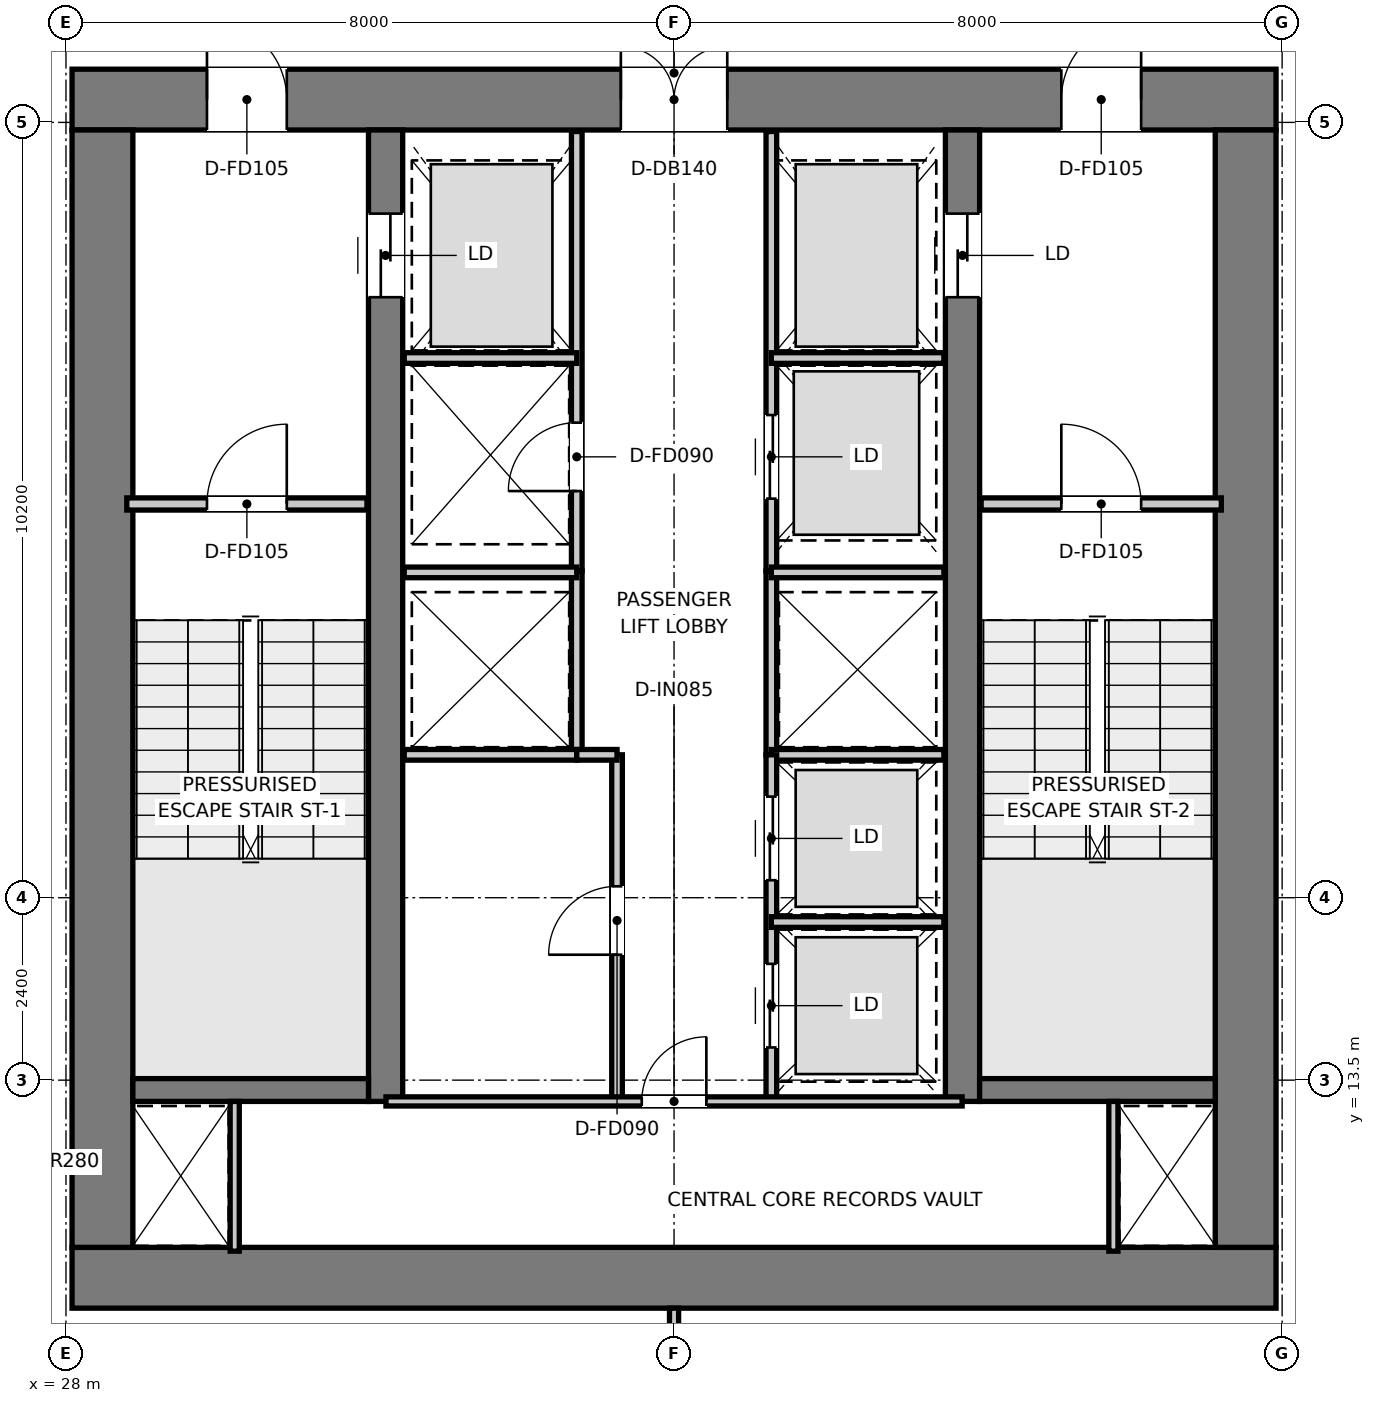
"""IFC4 building model, lengths in metres.
Left out: names, types, materials, properties, quantities, classifications, styles, units other than length and angle.
Written with IfcOpenShell. Run it as: python <this file> out.ifc"""

import sys

from ifc_helpers import new_model, si_unit, direction, frame, frame_2d, origin, place, context, subcontext, project, spatial, rectangle, extrude, element, fill, save


model = new_model("IFC4")
c1 = context("Model", 3, precision=1e-05, world=origin(), true_north=direction((0.0, 1.0)))
c2 = subcontext(c1, "Body", "Model", "MODEL_VIEW")
j1 = project(units=[si_unit("LENGTHUNIT", "METRE"), si_unit("PLANEANGLEUNIT", "RADIAN")], contexts=[c1])
p1 = place(None, origin())
s1 = spatial("IfcSite", under=j1, at=p1, CompositionType="ELEMENT")
p2 = place(p1, origin())
s2 = spatial("IfcBuilding", under=s1, at=p2, CompositionType="ELEMENT")
p3 = place(p2, frame((0.0, 0.0, 177.8)))
s3 = spatial("IfcBuildingStorey", under=s2, at=p3, CompositionType="ELEMENT", Elevation=177.8)
p4 = place(p3, frame((28.08, 10.9, 0.0), z_axis=(0.0, 0.0, 1.0), x_axis=(1.0, 0.0, 0.0)))
e1 = element("IfcWall", 1, at=p4, inside=s3, PredefinedType="SHEAR", context=c2, shape_type="SweptSolid", body=[
    extrude(rectangle(XDim=15.84, YDim=0.8, at=frame_2d((7.92, 0.0))), origin(), (0.0, 0.0, 1.0), 3.95),
])
p5 = place(p3, frame((28.08, 26.4, 0.0), z_axis=(0.0, 0.0, 1.0), x_axis=(1.0, 0.0, 0.0)))
e2 = element("IfcWall", 2, at=p5, inside=s3, PredefinedType="SHEAR", context=c2, shape_type="SweptSolid", body=[
    extrude(rectangle(XDim=15.84, YDim=0.8, at=frame_2d((7.92, 0.0))), origin(), (0.0, 0.0, 1.0), 3.95),
])
p6 = place(p5, frame((7.22, 0.0, 0.0)))
e3 = element("IfcOpeningElement", 3, at=p6, cuts=e2, PredefinedType="OPENING", context=c2, shape_type="SweptSolid", body=[
    extrude(rectangle(XDim=1.4, YDim=2.2, at=frame_2d((0.7, 1.1))), frame((0.0, 0.41, 0.0), z_axis=(0.0, -1.0, 0.0), x_axis=(1.0, 0.0, 0.0)), (0.0, 0.0, 1.0), 0.82),
])
p7 = place(p5, frame((1.775, 0.0, 0.0)))
e4 = element("IfcOpeningElement", 4, at=p7, cuts=e2, PredefinedType="OPENING", context=c2, shape_type="SweptSolid", body=[
    extrude(rectangle(XDim=1.05, YDim=2.1, at=frame_2d((0.525, 1.05))), frame((0.0, 0.41, 0.0), z_axis=(0.0, -1.0, 0.0), x_axis=(1.0, 0.0, 0.0)), (0.0, 0.0, 1.0), 0.82),
])
p8 = place(p5, frame((13.015, 0.0, 0.0)))
e5 = element("IfcOpeningElement", 5, at=p8, cuts=e2, PredefinedType="OPENING", context=c2, shape_type="SweptSolid", body=[
    extrude(rectangle(XDim=1.05, YDim=2.1, at=frame_2d((0.525, 1.05))), frame((0.0, 0.41, 0.0), z_axis=(0.0, -1.0, 0.0), x_axis=(1.0, 0.0, 0.0)), (0.0, 0.0, 1.0), 0.82),
])
for number, where, z_axis, x_axis in (
    (6, (28.48, 11.3, 0.0), (0.0, 0.0, 1.0), (0.0, 1.0, 0.0)),
    (7, (43.52, 11.3, 0.0), (0.0, 0.0, 1.0), (0.0, 1.0, 0.0)),
):
    element("IfcWall", number, at=place(p3, frame(where, z_axis=z_axis, x_axis=x_axis)), inside=s3, PredefinedType="SHEAR", context=c2, shape_type="SweptSolid", body=[
        extrude(rectangle(XDim=14.7, YDim=0.8, at=frame_2d((7.35, 0.0))), origin(), (0.0, 0.0, 1.0), 3.95),
    ])
p9 = place(p3, frame((32.205, 13.22, 0.0), z_axis=(0.0, 0.0, 1.0), x_axis=(0.0, 1.0, 0.0)))
e8 = element("IfcWall", 8, at=p9, inside=s3, PredefinedType="SHEAR", context=c2, shape_type="SweptSolid", body=[
    extrude(rectangle(XDim=12.78, YDim=0.45, at=frame_2d((6.39, 0.0))), origin(), (0.0, 0.0, 1.0), 3.95),
])
p10 = place(p9, frame((10.58, 0.0, 0.0)))
e9 = element("IfcOpeningElement", 9, at=p10, cuts=e8, PredefinedType="OPENING", context=c2, shape_type="SweptSolid", body=[
    extrude(rectangle(XDim=1.1, YDim=2.15, at=frame_2d((0.55, 1.075))), frame((0.0, 0.235, 0.0), z_axis=(0.0, -1.0, 0.0), x_axis=(1.0, 0.0, 0.0)), (0.0, 0.0, 1.0), 0.47),
])
p11 = place(p3, frame((39.795, 13.22, 0.0), z_axis=(0.0, 0.0, 1.0), x_axis=(0.0, 1.0, 0.0)))
e10 = element("IfcWall", 10, at=p11, inside=s3, PredefinedType="SHEAR", context=c2, shape_type="SweptSolid", body=[
    extrude(rectangle(XDim=12.78, YDim=0.45, at=frame_2d((6.39, 0.0))), origin(), (0.0, 0.0, 1.0), 3.95),
])
p12 = place(p11, frame((10.58, 0.0, 0.0)))
e11 = element("IfcOpeningElement", 11, at=p12, cuts=e10, PredefinedType="OPENING", context=c2, shape_type="SweptSolid", body=[
    extrude(rectangle(XDim=1.1, YDim=2.15, at=frame_2d((0.55, 1.075))), frame((0.0, 0.235, 0.0), z_axis=(0.0, -1.0, 0.0), x_axis=(1.0, 0.0, 0.0)), (0.0, 0.0, 1.0), 0.47),
])
for number, where, z_axis, x_axis in (
    (12, (28.88, 13.37, 0.0), (0.0, 0.0, 1.0), (1.0, 0.0, 0.0)),
    (13, (40.02, 13.37, 0.0), (0.0, 0.0, 1.0), (1.0, 0.0, 0.0)),
):
    element("IfcWall", number, at=place(p3, frame(where, z_axis=z_axis, x_axis=x_axis)), inside=s3, PredefinedType="SHEAR", context=c2, shape_type="SweptSolid", body=[
        extrude(rectangle(XDim=3.1, YDim=0.3, at=frame_2d((1.55, 0.0))), origin(), (0.0, 0.0, 1.0), 3.95),
    ])
p13 = place(p3, frame((28.8, 21.08, 0.0), z_axis=(0.0, 0.0, 1.0), x_axis=(1.0, 0.0, 0.0)))
e14 = element("IfcWall", 14, at=p13, inside=s3, PredefinedType="PARTITIONING", context=c2, shape_type="SweptSolid", body=[
    extrude(rectangle(XDim=3.16, YDim=0.16, at=frame_2d((1.58, 0.0))), origin(), (0.0, 0.0, 1.0), 3.67),
])
p14 = place(p13, frame((1.055, 0.0, 0.0)))
e15 = element("IfcOpeningElement", 15, at=p14, cuts=e14, PredefinedType="OPENING", context=c2, shape_type="SweptSolid", body=[
    extrude(rectangle(XDim=1.05, YDim=2.1, at=frame_2d((0.525, 1.05))), frame((0.0, 0.09, 0.0), z_axis=(0.0, -1.0, 0.0), x_axis=(1.0, 0.0, 0.0)), (0.0, 0.0, 1.0), 0.18),
])
p15 = place(p3, frame((40.04, 21.08, 0.0), z_axis=(0.0, 0.0, 1.0), x_axis=(1.0, 0.0, 0.0)))
e16 = element("IfcWall", 16, at=p15, inside=s3, PredefinedType="PARTITIONING", context=c2, shape_type="SweptSolid", body=[
    extrude(rectangle(XDim=3.16, YDim=0.16, at=frame_2d((1.58, 0.0))), origin(), (0.0, 0.0, 1.0), 3.67),
])
p16 = place(p15, frame((1.055, 0.0, 0.0)))
e17 = element("IfcOpeningElement", 17, at=p16, cuts=e16, PredefinedType="OPENING", context=c2, shape_type="SweptSolid", body=[
    extrude(rectangle(XDim=1.05, YDim=2.1, at=frame_2d((0.525, 1.05))), frame((0.0, 0.09, 0.0), z_axis=(0.0, -1.0, 0.0), x_axis=(1.0, 0.0, 0.0)), (0.0, 0.0, 1.0), 0.18),
])
p17 = place(p3, frame((34.72, 20.2, 0.0), z_axis=(0.0, 0.0, 1.0), x_axis=(0.0, 1.0, 0.0)))
e18 = element("IfcWall", 18, at=p17, inside=s3, PredefinedType="PARTITIONING", context=c2, shape_type="SweptSolid", body=[
    extrude(rectangle(XDim=5.78, YDim=0.14, at=frame_2d((2.89, 0.0))), origin(), (0.0, 0.0, 1.0), 2.67),
])
p18 = place(p17, frame((1.05, 0.0, 0.0)))
e19 = element("IfcOpeningElement", 19, at=p18, cuts=e18, PredefinedType="OPENING", context=c2, shape_type="SweptSolid", body=[
    extrude(rectangle(XDim=0.9, YDim=2.1, at=frame_2d((0.45, 1.05))), frame((0.0, 0.08, 0.0), z_axis=(0.0, -1.0, 0.0), x_axis=(1.0, 0.0, 0.0)), (0.0, 0.0, 1.0), 0.16),
])
p19 = place(p3, frame((37.28, 20.2, 0.0), z_axis=(0.0, 0.0, 1.0), x_axis=(0.0, 1.0, 0.0)))
e20 = element("IfcWall", 20, at=p19, inside=s3, PredefinedType="PARTITIONING", context=c2, shape_type="SweptSolid", body=[
    extrude(rectangle(XDim=5.78, YDim=0.14, at=frame_2d((2.89, 0.0))), origin(), (0.0, 0.0, 1.0), 2.67),
])
p20 = place(p19, frame((0.95, 0.0, 0.0)))
e21 = element("IfcOpeningElement", 21, at=p20, cuts=e20, PredefinedType="OPENING", context=c2, shape_type="SweptSolid", body=[
    extrude(rectangle(XDim=1.1, YDim=2.15, at=frame_2d((0.55, 1.075))), frame((0.0, 0.08, 0.0), z_axis=(0.0, -1.0, 0.0), x_axis=(1.0, 0.0, 0.0)), (0.0, 0.0, 1.0), 0.16),
])
for number, where, z_axis, x_axis in (
    (22, (32.45, 23.0, 0.0), (0.0, 0.0, 1.0), (1.0, 0.0, 0.0)),
    (23, (37.28, 23.0, 0.0), (0.0, 0.0, 1.0), (1.0, 0.0, 0.0)),
):
    element("IfcWall", number, at=place(p3, frame(where, z_axis=z_axis, x_axis=x_axis)), inside=s3, PredefinedType="PARTITIONING", context=c2, shape_type="SweptSolid", body=[
        extrude(rectangle(XDim=2.27, YDim=0.14, at=frame_2d((1.135, 0.0))), origin(), (0.0, 0.0, 1.0), 2.67),
    ])
for number, where, z_axis, x_axis in (
    (24, (34.72, 17.78, 0.0), (0.0, 0.0, 1.0), (0.0, 1.0, 0.0)),
    (25, (37.28, 17.78, 0.0), (0.0, 0.0, 1.0), (0.0, 1.0, 0.0)),
):
    element("IfcWall", number, at=place(p3, frame(where, z_axis=z_axis, x_axis=x_axis)), inside=s3, PredefinedType="PARTITIONING", context=c2, shape_type="SweptSolid", body=[
        extrude(rectangle(XDim=2.42, YDim=0.14, at=frame_2d((1.21, 0.0))), origin(), (0.0, 0.0, 1.0), 3.67),
    ])
for number, where, z_axis, x_axis in (
    (26, (32.45, 17.78, 0.0), (0.0, 0.0, 1.0), (1.0, 0.0, 0.0)),
    (27, (32.45, 20.18, 0.0), (0.0, 0.0, 1.0), (1.0, 0.0, 0.0)),
    (28, (37.28, 17.78, 0.0), (0.0, 0.0, 1.0), (1.0, 0.0, 0.0)),
    (29, (37.28, 20.18, 0.0), (0.0, 0.0, 1.0), (1.0, 0.0, 0.0)),
):
    element("IfcWall", number, at=place(p3, frame(where, z_axis=z_axis, x_axis=x_axis)), inside=s3, PredefinedType="PARTITIONING", context=c2, shape_type="SweptSolid", body=[
        extrude(rectangle(XDim=2.27, YDim=0.14, at=frame_2d((1.135, 0.0))), origin(), (0.0, 0.0, 1.0), 3.67),
    ])
p21 = place(p3, frame((35.25, 13.22, 0.0), z_axis=(0.0, 0.0, 1.0), x_axis=(0.0, 1.0, 0.0)))
e30 = element("IfcWall", 30, at=p21, inside=s3, PredefinedType="PARTITIONING", context=c2, shape_type="SweptSolid", body=[
    extrude(rectangle(XDim=4.56, YDim=0.14, at=frame_2d((2.28, 0.0))), origin(), (0.0, 0.0, 1.0), 3.67),
])
p22 = place(p21, frame((1.93, 0.0, 0.0)))
e31 = element("IfcOpeningElement", 31, at=p22, cuts=e30, PredefinedType="OPENING", context=c2, shape_type="SweptSolid", body=[
    extrude(rectangle(XDim=0.9, YDim=2.1, at=frame_2d((0.45, 1.05))), frame((0.0, 0.08, 0.0), z_axis=(0.0, -1.0, 0.0), x_axis=(1.0, 0.0, 0.0)), (0.0, 0.0, 1.0), 0.16),
])
p23 = place(p3, frame((34.72, 17.78, 0.0), z_axis=(0.0, 0.0, 1.0), x_axis=(1.0, 0.0, 0.0)))
e32 = element("IfcWall", 32, at=p23, inside=s3, PredefinedType="PARTITIONING", context=c2, shape_type="SweptSolid", body=[
    extrude(rectangle(XDim=0.53, YDim=0.14, at=frame_2d((0.265, 0.0))), origin(), (0.0, 0.0, 1.0), 3.67),
])
p24 = place(p3, frame((37.28, 13.22, 0.0), z_axis=(0.0, 0.0, 1.0), x_axis=(0.0, 1.0, 0.0)))
e33 = element("IfcWall", 33, at=p24, inside=s3, PredefinedType="PARTITIONING", context=c2, shape_type="SweptSolid", body=[
    extrude(rectangle(XDim=4.56, YDim=0.14, at=frame_2d((2.28, 0.0))), origin(), (0.0, 0.0, 1.0), 3.67),
])
p25 = place(p24, frame((0.71, 0.0, 0.0)))
e34 = element("IfcOpeningElement", 34, at=p25, cuts=e33, PredefinedType="OPENING", context=c2, shape_type="SweptSolid", body=[
    extrude(rectangle(XDim=1.1, YDim=2.15, at=frame_2d((0.55, 1.075))), frame((0.0, 0.08, 0.0), z_axis=(0.0, -1.0, 0.0), x_axis=(1.0, 0.0, 0.0)), (0.0, 0.0, 1.0), 0.16),
])
p26 = place(p24, frame((2.91, 0.0, 0.0)))
e35 = element("IfcOpeningElement", 35, at=p26, cuts=e33, PredefinedType="OPENING", context=c2, shape_type="SweptSolid", body=[
    extrude(rectangle(XDim=1.1, YDim=2.15, at=frame_2d((0.55, 1.075))), frame((0.0, 0.08, 0.0), z_axis=(0.0, -1.0, 0.0), x_axis=(1.0, 0.0, 0.0)), (0.0, 0.0, 1.0), 0.16),
])
p27 = place(p3, frame((37.28, 15.58, 0.0), z_axis=(0.0, 0.0, 1.0), x_axis=(1.0, 0.0, 0.0)))
e36 = element("IfcWall", 36, at=p27, inside=s3, PredefinedType="PARTITIONING", context=c2, shape_type="SweptSolid", body=[
    extrude(rectangle(XDim=2.27, YDim=0.14, at=frame_2d((1.135, 0.0))), origin(), (0.0, 0.0, 1.0), 3.67),
])
for number, where, z_axis, x_axis in (
    (37, (30.22, 11.25, 0.0), (0.0, 0.0, 1.0), (0.0, 1.0, 0.0)),
    (38, (41.78, 11.25, 0.0), (0.0, 0.0, 1.0), (0.0, 1.0, 0.0)),
):
    element("IfcWall", number, at=place(p3, frame(where, z_axis=z_axis, x_axis=x_axis)), inside=s3, PredefinedType="PARTITIONING", context=c2, shape_type="SweptSolid", body=[
        extrude(rectangle(XDim=1.97, YDim=0.12, at=frame_2d((0.985, 0.0))), origin(), (0.0, 0.0, 1.0), 3.67),
    ])
p28 = place(p3, frame((32.21, 13.22, 0.0), z_axis=(0.0, 0.0, 1.0), x_axis=(1.0, 0.0, 0.0)))
e39 = element("IfcWall", 39, at=p28, inside=s3, PredefinedType="PARTITIONING", context=c2, shape_type="SweptSolid", body=[
    extrude(rectangle(XDim=7.58, YDim=0.12, at=frame_2d((3.79, 0.0))), origin(), (0.0, 0.0, 1.0), 3.67),
])
p29 = place(p28, frame((3.365, 0.0, 0.0)))
e40 = element("IfcOpeningElement", 40, at=p29, cuts=e39, PredefinedType="OPENING", context=c2, shape_type="SweptSolid", body=[
    extrude(rectangle(XDim=0.85, YDim=2.1, at=frame_2d((0.425, 1.05))), frame((0.0, 0.07, 0.0), z_axis=(0.0, -1.0, 0.0), x_axis=(1.0, 0.0, 0.0)), (0.0, 0.0, 1.0), 0.14),
])
p30 = place(p3, frame((36.0, 1.017, 0.0), z_axis=(0.0, 0.0, 1.0), x_axis=(0.0, 1.0, 0.0)))
e41 = element("IfcWall", 41, at=p30, inside=s3, PredefinedType="PARTITIONING", context=c2, shape_type="SweptSolid", body=[
    extrude(rectangle(XDim=9.483, YDim=0.12, at=frame_2d((4.741, 0.0))), origin(), (0.0, 0.0, 1.0), 3.67),
])
p31 = place(p14, origin())
e42 = element("IfcDoor", 42, at=p31, inside=s3, OperationType="SINGLE_SWING_RIGHT", PredefinedType="DOOR", context=c2, shape_type="SweptSolid", body=[
    extrude(rectangle(XDim=1.05, YDim=2.1, at=frame_2d((0.525, 1.05))), frame((0.0, 0.025, 0.0), z_axis=(0.0, -1.0, 0.0), x_axis=(1.0, 0.0, 0.0)), (0.0, 0.0, 1.0), 0.05),
])
fill(e15, e42)
p32 = place(p16, origin())
e43 = element("IfcDoor", 43, at=p32, inside=s3, OperationType="SINGLE_SWING_LEFT", PredefinedType="DOOR", context=c2, shape_type="SweptSolid", body=[
    extrude(rectangle(XDim=1.05, YDim=2.1, at=frame_2d((0.525, 1.05))), frame((0.0, 0.025, 0.0), z_axis=(0.0, -1.0, 0.0), x_axis=(1.0, 0.0, 0.0)), (0.0, 0.0, 1.0), 0.05),
])
fill(e17, e43)
p33 = place(p6, origin())
e44 = element("IfcDoor", 44, at=p33, inside=s3, OperationType="DOUBLE_DOOR_SINGLE_SWING", PredefinedType="DOOR", context=c2, shape_type="SweptSolid", body=[
    extrude(rectangle(XDim=1.4, YDim=2.2, at=frame_2d((0.7, 1.1))), frame((0.0, 0.025, 0.0), z_axis=(0.0, -1.0, 0.0), x_axis=(1.0, 0.0, 0.0)), (0.0, 0.0, 1.0), 0.05),
])
fill(e3, e44)
p34 = place(p7, origin())
e45 = element("IfcDoor", 45, at=p34, inside=s3, OperationType="SINGLE_SWING_LEFT", PredefinedType="DOOR", context=c2, shape_type="SweptSolid", body=[
    extrude(rectangle(XDim=1.05, YDim=2.1, at=frame_2d((0.525, 1.05))), frame((0.0, 0.025, 0.0), z_axis=(0.0, -1.0, 0.0), x_axis=(1.0, 0.0, 0.0)), (0.0, 0.0, 1.0), 0.05),
])
fill(e4, e45)
p35 = place(p8, origin())
e46 = element("IfcDoor", 46, at=p35, inside=s3, OperationType="SINGLE_SWING_RIGHT", PredefinedType="DOOR", context=c2, shape_type="SweptSolid", body=[
    extrude(rectangle(XDim=1.05, YDim=2.1, at=frame_2d((0.525, 1.05))), frame((0.0, 0.025, 0.0), z_axis=(0.0, -1.0, 0.0), x_axis=(1.0, 0.0, 0.0)), (0.0, 0.0, 1.0), 0.05),
])
fill(e5, e46)
p36 = place(p10, origin())
e47 = element("IfcDoor", 47, at=p36, inside=s3, OperationType="DOUBLE_DOOR_SLIDING", PredefinedType="DOOR", context=c2, shape_type="SweptSolid", body=[
    extrude(rectangle(XDim=1.1, YDim=2.15, at=frame_2d((0.55, 1.075))), frame((0.0, 0.025, 0.0), z_axis=(0.0, -1.0, 0.0), x_axis=(1.0, 0.0, 0.0)), (0.0, 0.0, 1.0), 0.05),
])
fill(e9, e47)
p37 = place(p12, origin())
e48 = element("IfcDoor", 48, at=p37, inside=s3, OperationType="DOUBLE_DOOR_SLIDING", PredefinedType="DOOR", context=c2, shape_type="SweptSolid", body=[
    extrude(rectangle(XDim=1.1, YDim=2.15, at=frame_2d((0.55, 1.075))), frame((0.0, 0.025, 0.0), z_axis=(0.0, -1.0, 0.0), x_axis=(1.0, 0.0, 0.0)), (0.0, 0.0, 1.0), 0.05),
])
fill(e11, e48)
p38 = place(p18, origin())
e49 = element("IfcDoor", 49, at=p38, inside=s3, OperationType="SINGLE_SWING_LEFT", PredefinedType="DOOR", context=c2, shape_type="SweptSolid", body=[
    extrude(rectangle(XDim=0.9, YDim=2.1, at=frame_2d((0.45, 1.05))), frame((0.0, 0.025, 0.0), z_axis=(0.0, -1.0, 0.0), x_axis=(1.0, 0.0, 0.0)), (0.0, 0.0, 1.0), 0.05),
])
fill(e19, e49)
p39 = place(p20, origin())
e50 = element("IfcDoor", 50, at=p39, inside=s3, OperationType="DOUBLE_DOOR_SLIDING", PredefinedType="DOOR", context=c2, shape_type="SweptSolid", body=[
    extrude(rectangle(XDim=1.1, YDim=2.15, at=frame_2d((0.55, 1.075))), frame((0.0, 0.025, 0.0), z_axis=(0.0, -1.0, 0.0), x_axis=(1.0, 0.0, 0.0)), (0.0, 0.0, 1.0), 0.05),
])
fill(e21, e50)
p40 = place(p22, origin())
e51 = element("IfcDoor", 51, at=p40, inside=s3, OperationType="SINGLE_SWING_LEFT", PredefinedType="DOOR", context=c2, shape_type="SweptSolid", body=[
    extrude(rectangle(XDim=0.9, YDim=2.1, at=frame_2d((0.45, 1.05))), frame((0.0, 0.025, 0.0), z_axis=(0.0, -1.0, 0.0), x_axis=(1.0, 0.0, 0.0)), (0.0, 0.0, 1.0), 0.05),
])
fill(e31, e51)
p41 = place(p25, origin())
e52 = element("IfcDoor", 52, at=p41, inside=s3, OperationType="DOUBLE_DOOR_SLIDING", PredefinedType="DOOR", context=c2, shape_type="SweptSolid", body=[
    extrude(rectangle(XDim=1.1, YDim=2.15, at=frame_2d((0.55, 1.075))), frame((0.0, 0.025, 0.0), z_axis=(0.0, -1.0, 0.0), x_axis=(1.0, 0.0, 0.0)), (0.0, 0.0, 1.0), 0.05),
])
fill(e34, e52)
p42 = place(p26, origin())
e53 = element("IfcDoor", 53, at=p42, inside=s3, OperationType="DOUBLE_DOOR_SLIDING", PredefinedType="DOOR", context=c2, shape_type="SweptSolid", body=[
    extrude(rectangle(XDim=1.1, YDim=2.15, at=frame_2d((0.55, 1.075))), frame((0.0, 0.025, 0.0), z_axis=(0.0, -1.0, 0.0), x_axis=(1.0, 0.0, 0.0)), (0.0, 0.0, 1.0), 0.05),
])
fill(e35, e53)
p43 = place(p29, origin())
e54 = element("IfcDoor", 54, at=p43, inside=s3, OperationType="SINGLE_SWING_RIGHT", PredefinedType="DOOR", context=c2, shape_type="SweptSolid", body=[
    extrude(rectangle(XDim=0.85, YDim=2.1, at=frame_2d((0.425, 1.05))), frame((0.0, 0.025, 0.0), z_axis=(0.0, -1.0, 0.0), x_axis=(1.0, 0.0, 0.0)), (0.0, 0.0, 1.0), 0.05),
])
fill(e40, e54)
save(model, sys.argv[1])
